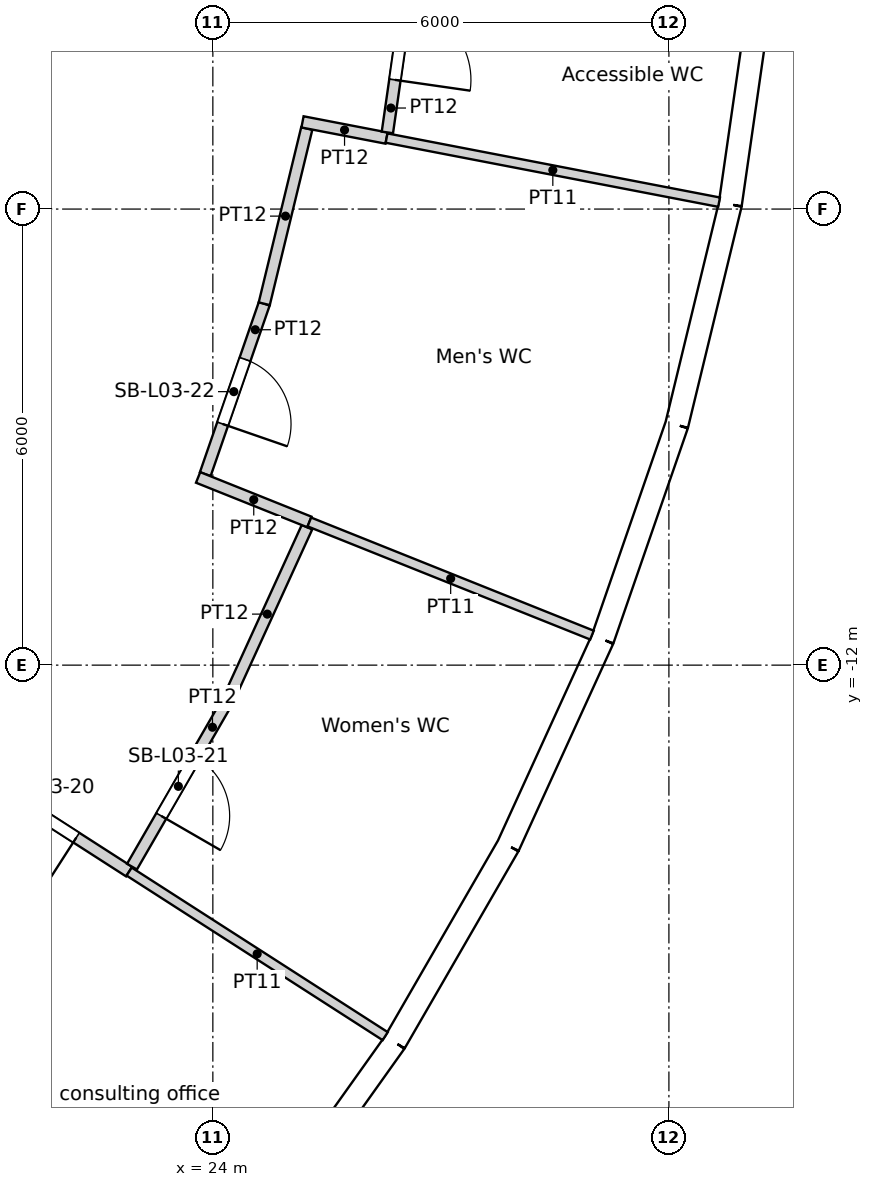
"""IFC4 building model, lengths in metres.
Left out: names, types, materials, properties, quantities, classifications, styles, units other than length and angle.
Written with IfcOpenShell. Run it as: python <this file> out.ifc"""

import sys

from ifc_helpers import new_model, si_unit, direction, frame, frame_2d, origin, origin_2d, place, context, subcontext, project, spatial, rectangle, circle, extrude, element, fill, save


model = new_model("IFC4")
c1 = context("Model", 3, precision=1e-05, world=origin(), true_north=direction((0.0, 1.0)))
c2 = subcontext(c1, "Body", "Model", "MODEL_VIEW")
j1 = project(units=[si_unit("LENGTHUNIT", "METRE"), si_unit("PLANEANGLEUNIT", "RADIAN")], contexts=[c1])
p1 = place(None, origin())
s1 = spatial("IfcSite", under=j1, at=p1, CompositionType="ELEMENT")
p2 = place(p1, origin())
s2 = spatial("IfcBuilding", under=s1, at=p2, CompositionType="ELEMENT")
p3 = place(p2, frame((0.0, 0.0, 18.6)))
s3 = spatial("IfcBuildingStorey", under=s2, at=p3, CompositionType="ELEMENT", Elevation=18.6)
for number, where, z_axis, x_axis in (
    (1, (25.469, -16.368, 0.0), (0.0, 0.0, 1.0), (1.0, 0.0, 0.0)),
    (2, (28.106, -11.252, 0.0), (0.0, 0.0, 1.0), (1.0, 0.0, 0.0)),
    (3, (29.728, -5.729, 0.0), (0.0, 0.0, 1.0), (1.0, 0.0, 0.0)),
):
    element("IfcColumn", number, at=place(p3, frame(where, z_axis=z_axis, x_axis=x_axis)), inside=s3, PredefinedType="COLUMN", context=c2, shape_type="SweptSolid", body=[
        extrude(circle(Radius=0.7, at=origin_2d()), origin(), (0.0, 0.0, 1.0), 4.8),
    ])
for number, where, z_axis, x_axis in (
    (4, (21.937, -11.017, 0.0), (0.0, 0.0, 1.0), (1.0, 0.0, 0.0)),
    (5, (23.886, -5.661, 0.0), (0.0, 0.0, 1.0), (1.0, 0.0, 0.0)),
):
    element("IfcColumn", number, at=place(p3, frame(where, z_axis=z_axis, x_axis=x_axis)), inside=s3, PredefinedType="COLUMN", context=c2, shape_type="SweptSolid", body=[
        extrude(circle(Radius=0.75, at=origin_2d()), origin(), (0.0, 0.0, 1.0), 4.8),
    ])
p4 = place(p3, frame((24.662, -19.394, 0.0), z_axis=(0.0, 0.0, 1.0), x_axis=(0.580100533892, 0.814544885551, 0.0)))
e6 = element("IfcWall", 6, at=p4, inside=s3, PredefinedType="SOLIDWALL", context=c2, shape_type="SweptSolid", body=[
    extrude(rectangle(XDim=2.986, YDim=0.3, at=frame_2d((1.493, 0.0))), origin(), (0.0, 0.0, 1.0), 4.35),
])
p5 = place(p4, frame((1.493, 0.0, 2.0)))
e7 = element("IfcOpeningElement", 7, at=p5, cuts=e6, PredefinedType="OPENING", context=c2, shape_type="SweptSolid", body=[
    extrude(circle(Radius=1.2, at=origin_2d()), frame((0.0, 0.16, 0.0), z_axis=(0.0, -1.0, 0.0), x_axis=(1.0, 0.0, 0.0)), (0.0, 0.0, 1.0), 0.32),
])
p6 = place(p3, frame((26.394, -16.962, 0.0), z_axis=(0.0, 0.0, 1.0), x_axis=(0.500017373705, 0.866015372839, 0.0)))
e8 = element("IfcWall", 8, at=p6, inside=s3, PredefinedType="SOLIDWALL", context=c2, shape_type="SweptSolid", body=[
    extrude(rectangle(XDim=2.986, YDim=0.3, at=frame_2d((1.493, 0.0))), origin(), (0.0, 0.0, 1.0), 4.35),
])
p7 = place(p6, frame((1.493, 0.0, 2.0)))
e9 = element("IfcOpeningElement", 9, at=p7, cuts=e8, PredefinedType="OPENING", context=c2, shape_type="SweptSolid", body=[
    extrude(circle(Radius=1.2, at=origin_2d()), frame((0.0, 0.16, 0.0), z_axis=(0.0, -1.0, 0.0), x_axis=(1.0, 0.0, 0.0)), (0.0, 0.0, 1.0), 0.32),
])
p8 = place(p3, frame((27.887, -14.377, 0.0), z_axis=(0.0, 0.0, 1.0), x_axis=(0.415373250944, 0.909651066289, 0.0)))
e10 = element("IfcWall", 10, at=p8, inside=s3, PredefinedType="SOLIDWALL", context=c2, shape_type="SweptSolid", body=[
    extrude(rectangle(XDim=2.986, YDim=0.3, at=frame_2d((1.493, 0.0))), origin(), (0.0, 0.0, 1.0), 4.35),
])
p9 = place(p8, frame((1.493, 0.0, 2.0)))
e11 = element("IfcOpeningElement", 11, at=p9, cuts=e10, PredefinedType="OPENING", context=c2, shape_type="SweptSolid", body=[
    extrude(circle(Radius=1.2, at=origin_2d()), frame((0.0, 0.16, 0.0), z_axis=(0.0, -1.0, 0.0), x_axis=(1.0, 0.0, 0.0)), (0.0, 0.0, 1.0), 0.32),
])
p10 = place(p3, frame((29.127, -11.661, 0.0), z_axis=(0.0, 0.0, 1.0), x_axis=(0.327074054052, 0.944998710669, 0.0)))
e12 = element("IfcWall", 12, at=p10, inside=s3, PredefinedType="SOLIDWALL", context=c2, shape_type="SweptSolid", body=[
    extrude(rectangle(XDim=2.986, YDim=0.3, at=frame_2d((1.493, 0.0))), origin(), (0.0, 0.0, 1.0), 4.35),
])
p11 = place(p10, frame((1.493, 0.0, 2.0)))
e13 = element("IfcOpeningElement", 13, at=p11, cuts=e12, PredefinedType="OPENING", context=c2, shape_type="SweptSolid", body=[
    extrude(circle(Radius=1.2, at=origin_2d()), frame((0.0, 0.16, 0.0), z_axis=(0.0, -1.0, 0.0), x_axis=(1.0, 0.0, 0.0)), (0.0, 0.0, 1.0), 0.32),
])
p12 = place(p3, frame((30.104, -8.839, 0.0), z_axis=(0.0, 0.0, 1.0), x_axis=(0.235756834479, 0.971812078026, 0.0)))
e14 = element("IfcWall", 14, at=p12, inside=s3, PredefinedType="SOLIDWALL", context=c2, shape_type="SweptSolid", body=[
    extrude(rectangle(XDim=2.986, YDim=0.3, at=frame_2d((1.493, 0.0))), origin(), (0.0, 0.0, 1.0), 4.35),
])
p13 = place(p12, frame((1.493, 0.0, 2.0)))
e15 = element("IfcOpeningElement", 15, at=p13, cuts=e14, PredefinedType="OPENING", context=c2, shape_type="SweptSolid", body=[
    extrude(circle(Radius=1.2, at=origin_2d()), frame((0.0, 0.16, 0.0), z_axis=(0.0, -1.0, 0.0), x_axis=(1.0, 0.0, 0.0)), (0.0, 0.0, 1.0), 0.32),
])
p14 = place(p3, frame((30.807, -5.938, 0.0), z_axis=(0.0, 0.0, 1.0), x_axis=(0.142360001917, 0.989814947278, 0.0)))
e16 = element("IfcWall", 16, at=p14, inside=s3, PredefinedType="SOLIDWALL", context=c2, shape_type="SweptSolid", body=[
    extrude(rectangle(XDim=2.986, YDim=0.3, at=frame_2d((1.493, 0.0))), origin(), (0.0, 0.0, 1.0), 4.35),
])
p15 = place(p14, frame((1.493, 0.0, 2.0)))
e17 = element("IfcOpeningElement", 17, at=p15, cuts=e16, PredefinedType="OPENING", context=c2, shape_type="SweptSolid", body=[
    extrude(circle(Radius=1.2, at=origin_2d()), frame((0.0, 0.16, 0.0), z_axis=(0.0, -1.0, 0.0), x_axis=(1.0, 0.0, 0.0)), (0.0, 0.0, 1.0), 0.32),
])
p16 = place(p3, frame((22.598, -21.547, 0.0), z_axis=(0.0, 0.0, 1.0), x_axis=(-0.723762960711, 0.690048677054, 0.0)))
e18 = element("IfcWall", 18, at=p16, inside=s3, PredefinedType="PARTITIONING", context=c2, shape_type="SweptSolid", body=[
    extrude(rectangle(XDim=6.583, YDim=0.1, at=frame_2d((3.291, 0.0))), origin(), (0.0, 0.0, 1.0), 3.75),
])
p17 = place(p3, frame((22.899, -14.716, 0.0), z_axis=(0.0, 0.0, 1.0), x_axis=(-0.841254069526, 0.540639982341, 0.0)))
e19 = element("IfcWall", 19, at=p17, inside=s3, PredefinedType="PARTITIONING", context=c2, shape_type="SweptSolid", body=[
    extrude(rectangle(XDim=2.728, YDim=0.15, at=frame_2d((1.364, 0.0))), origin(), (0.0, 0.0, 1.0), 3.75),
])
p18 = place(p17, frame((0.826, 0.0, 0.0)))
e20 = element("IfcOpeningElement", 20, at=p18, cuts=e19, PredefinedType="OPENING", context=c2, shape_type="SweptSolid", body=[
    extrude(rectangle(XDim=1.0, YDim=2.1, at=frame_2d((0.5, 1.05))), frame((0.0, 0.075, 0.0), z_axis=(0.0, -1.0, 0.0), x_axis=(1.0, 0.0, 0.0)), (0.0, 0.0, 1.0), 0.15),
])
p19 = place(p3, frame((24.194, -12.473, 0.0), z_axis=(0.0, 0.0, 1.0), x_axis=(-0.499991329354, -0.866030409726, 0.0)))
e21 = element("IfcWall", 21, at=p19, inside=s3, PredefinedType="PARTITIONING", context=c2, shape_type="SweptSolid", body=[
    extrude(rectangle(XDim=2.515, YDim=0.15, at=frame_2d((1.258, 0.0))), origin(), (0.0, 0.0, 1.0), 3.75),
])
p20 = place(p19, frame((0.845, 0.0, 0.0)))
e22 = element("IfcOpeningElement", 22, at=p20, cuts=e21, PredefinedType="OPENING", context=c2, shape_type="SweptSolid", body=[
    extrude(rectangle(XDim=0.9, YDim=2.1, at=frame_2d((0.45, 1.05))), frame((0.0, 0.075, 0.0), z_axis=(0.0, -1.0, 0.0), x_axis=(1.0, 0.0, 0.0)), (0.0, 0.0, 1.0), 0.15),
])
p21 = place(p3, frame((24.676, -7.246, 0.0), z_axis=(0.0, 0.0, 1.0), x_axis=(-0.327043407404, -0.945009317242, 0.0)))
e23 = element("IfcWall", 23, at=p21, inside=s3, PredefinedType="PARTITIONING", context=c2, shape_type="SweptSolid", body=[
    extrude(rectangle(XDim=2.372, YDim=0.15, at=frame_2d((1.186, 0.0))), origin(), (0.0, 0.0, 1.0), 3.75),
])
p22 = place(p21, frame((0.774, 0.0, 0.0)))
e24 = element("IfcOpeningElement", 24, at=p22, cuts=e23, PredefinedType="OPENING", context=c2, shape_type="SweptSolid", body=[
    extrude(rectangle(XDim=0.9, YDim=2.1, at=frame_2d((0.45, 1.05))), frame((0.0, 0.075, 0.0), z_axis=(0.0, -1.0, 0.0), x_axis=(1.0, 0.0, 0.0)), (0.0, 0.0, 1.0), 0.15),
])
p23 = place(p3, frame((24.194, -12.473, 0.0), z_axis=(0.0, 0.0, 1.0), x_axis=(0.415411078746, 0.909633792059, 0.0)))
e25 = element("IfcWall", 25, at=p23, inside=s3, PredefinedType="PARTITIONING", context=c2, shape_type="SweptSolid", body=[
    extrude(rectangle(XDim=2.515, YDim=0.15, at=frame_2d((1.258, 0.0))), origin(), (0.0, 0.0, 1.0), 3.75),
])
p24 = place(p3, frame((24.676, -7.246, 0.0), z_axis=(0.0, 0.0, 1.0), x_axis=(0.235773804782, 0.971807960957, 0.0)))
e26 = element("IfcWall", 26, at=p24, inside=s3, PredefinedType="PARTITIONING", context=c2, shape_type="SweptSolid", body=[
    extrude(rectangle(XDim=2.372, YDim=0.15, at=frame_2d((1.186, 0.0))), origin(), (0.0, 0.0, 1.0), 3.75),
])
p25 = place(p3, frame((25.27, -10.116, 0.0), z_axis=(0.0, 0.0, 1.0), x_axis=(-0.928391240063, 0.37160423218, 0.0)))
e27 = element("IfcWall", 27, at=p25, inside=s3, PredefinedType="PARTITIONING", context=c2, shape_type="SweptSolid", body=[
    extrude(rectangle(XDim=1.577, YDim=0.15, at=frame_2d((0.788, 0.0))), origin(), (0.0, 0.0, 1.0), 3.75),
])
p26 = place(p3, frame((26.268, -16.881, 0.0), z_axis=(0.0, 0.0, 1.0), x_axis=(-0.841255718443, 0.540637416563, 0.0)))
e28 = element("IfcWall", 28, at=p26, inside=s3, PredefinedType="PARTITIONING", context=c2, shape_type="SweptSolid", body=[
    extrude(rectangle(XDim=4.005, YDim=0.125, at=frame_2d((2.002, 0.0))), origin(), (0.0, 0.0, 1.0), 3.75),
])
p27 = place(p3, frame((26.285, -5.066, 0.0), z_axis=(0.0, 0.0, 1.0), x_axis=(-0.981924394187, 0.189273569469, 0.0)))
e29 = element("IfcWall", 29, at=p27, inside=s3, PredefinedType="PARTITIONING", context=c2, shape_type="SweptSolid", body=[
    extrude(rectangle(XDim=1.126, YDim=0.15, at=frame_2d((0.563, 0.0))), origin(), (0.0, 0.0, 1.0), 3.75),
])
p28 = place(p3, frame((26.637, -2.619, 0.0), z_axis=(0.0, 0.0, 1.0), x_axis=(-0.142276797416, -0.989826910584, 0.0)))
e30 = element("IfcWall", 30, at=p28, inside=s3, PredefinedType="PARTITIONING", context=c2, shape_type="SweptSolid", body=[
    extrude(rectangle(XDim=2.397, YDim=0.15, at=frame_2d((1.199, 0.0))), origin(), (0.0, 0.0, 1.0), 3.75),
])
p29 = place(p28, frame((0.698, 0.0, 0.0)))
e31 = element("IfcOpeningElement", 31, at=p29, cuts=e30, PredefinedType="OPENING", context=c2, shape_type="SweptSolid", body=[
    extrude(rectangle(XDim=1.0, YDim=2.1, at=frame_2d((0.5, 1.05))), frame((0.0, 0.075, 0.0), z_axis=(0.0, -1.0, 0.0), x_axis=(1.0, 0.0, 0.0)), (0.0, 0.0, 1.0), 0.15),
])
p30 = place(p3, frame((28.988, -11.605, 0.0), z_axis=(0.0, 0.0, 1.0), x_axis=(-0.928346290212, 0.37171651221, 0.0)))
e32 = element("IfcWall", 32, at=p30, inside=s3, PredefinedType="PARTITIONING", context=c2, shape_type="SweptSolid", body=[
    extrude(rectangle(XDim=4.004, YDim=0.125, at=frame_2d((2.002, 0.0))), origin(), (0.0, 0.0, 1.0), 3.75),
])
p31 = place(p3, frame((30.66, -5.909, 0.0), z_axis=(0.0, 0.0, 1.0), x_axis=(-0.981932887056, 0.189229504353, 0.0)))
e33 = element("IfcWall", 33, at=p31, inside=s3, PredefinedType="PARTITIONING", context=c2, shape_type="SweptSolid", body=[
    extrude(rectangle(XDim=4.455, YDim=0.125, at=frame_2d((2.228, 0.0))), origin(), (0.0, 0.0, 1.0), 3.75),
])
p32 = place(p5, origin())
e34 = element("IfcWindow", 34, at=p32, inside=s3, PartitioningType="SINGLE_PANEL", PredefinedType="WINDOW", context=c2, shape_type="SweptSolid", body=[
    extrude(circle(Radius=1.2, at=origin_2d()), frame((0.0, 0.12, 0.0), z_axis=(0.0, -1.0, 0.0), x_axis=(1.0, 0.0, 0.0)), (0.0, 0.0, 1.0), 0.1),
])
fill(e7, e34)
p33 = place(p7, origin())
e35 = element("IfcWindow", 35, at=p33, inside=s3, PartitioningType="SINGLE_PANEL", PredefinedType="WINDOW", context=c2, shape_type="SweptSolid", body=[
    extrude(circle(Radius=1.2, at=origin_2d()), frame((0.0, 0.12, 0.0), z_axis=(0.0, -1.0, 0.0), x_axis=(1.0, 0.0, 0.0)), (0.0, 0.0, 1.0), 0.1),
])
fill(e9, e35)
p34 = place(p9, origin())
e36 = element("IfcWindow", 36, at=p34, inside=s3, PartitioningType="SINGLE_PANEL", PredefinedType="WINDOW", context=c2, shape_type="SweptSolid", body=[
    extrude(circle(Radius=1.2, at=origin_2d()), frame((0.0, 0.12, 0.0), z_axis=(0.0, -1.0, 0.0), x_axis=(1.0, 0.0, 0.0)), (0.0, 0.0, 1.0), 0.1),
])
fill(e11, e36)
p35 = place(p11, origin())
e37 = element("IfcWindow", 37, at=p35, inside=s3, PartitioningType="SINGLE_PANEL", PredefinedType="WINDOW", context=c2, shape_type="SweptSolid", body=[
    extrude(circle(Radius=1.2, at=origin_2d()), frame((0.0, 0.12, 0.0), z_axis=(0.0, -1.0, 0.0), x_axis=(1.0, 0.0, 0.0)), (0.0, 0.0, 1.0), 0.1),
])
fill(e13, e37)
p36 = place(p13, origin())
e38 = element("IfcWindow", 38, at=p36, inside=s3, PartitioningType="SINGLE_PANEL", PredefinedType="WINDOW", context=c2, shape_type="SweptSolid", body=[
    extrude(circle(Radius=1.2, at=origin_2d()), frame((0.0, 0.12, 0.0), z_axis=(0.0, -1.0, 0.0), x_axis=(1.0, 0.0, 0.0)), (0.0, 0.0, 1.0), 0.1),
])
fill(e15, e38)
p37 = place(p15, origin())
e39 = element("IfcWindow", 39, at=p37, inside=s3, PartitioningType="SINGLE_PANEL", PredefinedType="WINDOW", context=c2, shape_type="SweptSolid", body=[
    extrude(circle(Radius=1.2, at=origin_2d()), frame((0.0, 0.12, 0.0), z_axis=(0.0, -1.0, 0.0), x_axis=(1.0, 0.0, 0.0)), (0.0, 0.0, 1.0), 0.1),
])
fill(e17, e39)
p38 = place(p18, origin())
e40 = element("IfcDoor", 40, at=p38, inside=s3, OperationType="SINGLE_SWING_LEFT", PredefinedType="DOOR", context=c2, shape_type="SweptSolid", body=[
    extrude(rectangle(XDim=1.0, YDim=2.1, at=frame_2d((0.5, 1.05))), frame((0.0, 0.025, 0.0), z_axis=(0.0, -1.0, 0.0), x_axis=(1.0, 0.0, 0.0)), (0.0, 0.0, 1.0), 0.05),
])
fill(e20, e40)
p39 = place(p20, origin())
e41 = element("IfcDoor", 41, at=p39, inside=s3, OperationType="SINGLE_SWING_RIGHT", PredefinedType="DOOR", context=c2, shape_type="SweptSolid", body=[
    extrude(rectangle(XDim=0.9, YDim=2.1, at=frame_2d((0.45, 1.05))), frame((0.0, 0.025, 0.0), z_axis=(0.0, -1.0, 0.0), x_axis=(1.0, 0.0, 0.0)), (0.0, 0.0, 1.0), 0.05),
])
fill(e22, e41)
p40 = place(p22, origin())
e42 = element("IfcDoor", 42, at=p40, inside=s3, OperationType="SINGLE_SWING_RIGHT", PredefinedType="DOOR", context=c2, shape_type="SweptSolid", body=[
    extrude(rectangle(XDim=0.9, YDim=2.1, at=frame_2d((0.45, 1.05))), frame((0.0, 0.025, 0.0), z_axis=(0.0, -1.0, 0.0), x_axis=(1.0, 0.0, 0.0)), (0.0, 0.0, 1.0), 0.05),
])
fill(e24, e42)
p41 = place(p29, origin())
e43 = element("IfcDoor", 43, at=p41, inside=s3, OperationType="SINGLE_SWING_RIGHT", PredefinedType="DOOR", context=c2, shape_type="SweptSolid", body=[
    extrude(rectangle(XDim=1.0, YDim=2.1, at=frame_2d((0.5, 1.05))), frame((0.0, 0.025, 0.0), z_axis=(0.0, -1.0, 0.0), x_axis=(1.0, 0.0, 0.0)), (0.0, 0.0, 1.0), 0.05),
])
fill(e31, e43)
save(model, sys.argv[1])
